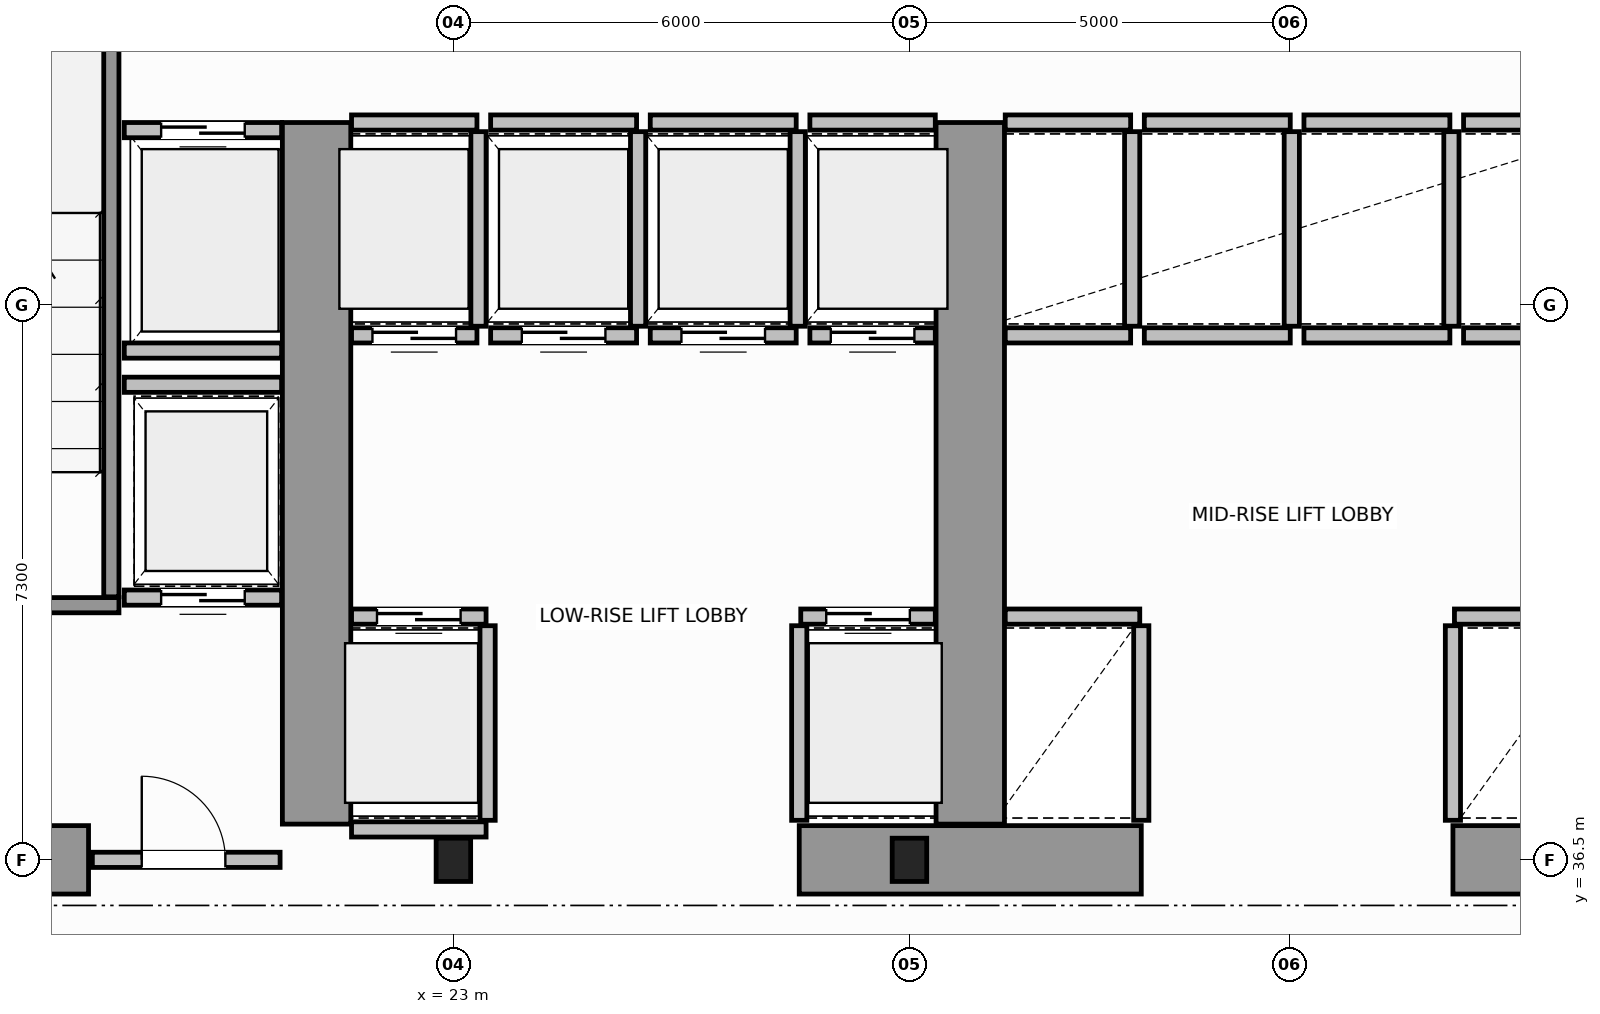
"""IFC4 building model, lengths in metres.
Left out: names, types, materials, properties, quantities, classifications, styles, units other than length and angle.
Written with IfcOpenShell. Run it as: python <this file> out.ifc"""

import sys

from ifc_helpers import new_model, si_unit, direction, frame, frame_2d, origin, origin_2d, place, context, subcontext, project, spatial, rectangle, i_section, extrude, source, transform, mapped, element, fill, save


model = new_model("IFC4")
c1 = context("Model", 3, precision=1e-05, world=origin(), true_north=direction((0.0, 1.0)))
c2 = subcontext(c1, "Body", "Model", "MODEL_VIEW")
j1 = project(units=[si_unit("LENGTHUNIT", "METRE"), si_unit("PLANEANGLEUNIT", "RADIAN")], contexts=[c1])
p1 = place(None, origin())
s1 = spatial("IfcSite", under=j1, at=p1, CompositionType="ELEMENT")
p2 = place(p1, origin())
s2 = spatial("IfcBuilding", under=s1, at=p2, CompositionType="ELEMENT")
p3 = place(p2, frame((0.0, 0.0, 41.6)))
s3 = spatial("IfcBuildingStorey", under=s2, at=p3, CompositionType="ELEMENT", Elevation=41.6)
m1 = source(origin(), c2, "Body", "SweptSolid", [
    extrude(i_section(OverallWidth=0.454, OverallDepth=0.569, WebThickness=0.078, FlangeThickness=0.08, FilletRadius=0.015, at=origin_2d()), origin(), (0.0, 0.0, 1.0), 3.8),
])
for number, where, z_axis, x_axis in (
    (1, (23.0, 36.5, 0.0), (0.0, 0.0, 1.0), (1.0, 0.0, 0.0)),
    (2, (29.0, 36.5, 0.0), (0.0, 0.0, 1.0), (1.0, 0.0, 0.0)),
):
    element("IfcColumn", number, at=place(p3, frame(where, z_axis=z_axis, x_axis=x_axis)), inside=s3, PredefinedType="COLUMN", context=c2, shape_type="MappedRepresentation", body=[
        mapped(m1, transform((0.0, 0.0, 0.0), scale=1.0)),
    ])
p4 = place(p3, frame((14.47, 36.5, 0.0), z_axis=(0.0, 0.0, 1.0), x_axis=(1.0, 0.0, 0.0)))
e3 = element("IfcWall", 3, at=p4, inside=s3, PredefinedType="SHEAR", context=c2, shape_type="SweptSolid", body=[
    extrude(rectangle(XDim=3.73, YDim=0.9, at=frame_2d((1.865, 0.0))), origin(), (0.0, 0.0, 1.0), 2.38),
])
for number, where, z_axis, x_axis in (
    (4, (27.55, 36.5, 0.0), (0.0, 0.0, 1.0), (1.0, 0.0, 0.0)),
    (5, (36.15, 36.5, 0.0), (0.0, 0.0, 1.0), (1.0, 0.0, 0.0)),
):
    element("IfcWall", number, at=place(p3, frame(where, z_axis=z_axis, x_axis=x_axis)), inside=s3, PredefinedType="SHEAR", context=c2, shape_type="SweptSolid", body=[
        extrude(rectangle(XDim=4.5, YDim=0.9, at=frame_2d((2.25, 0.0))), origin(), (0.0, 0.0, 1.0), 3.8),
    ])
for number, where, z_axis, x_axis in (
    (6, (21.2, 36.97, 0.0), (0.0, 0.0, 1.0), (0.0, 1.0, 0.0)),
    (7, (29.8, 36.97, 0.0), (0.0, 0.0, 1.0), (0.0, 1.0, 0.0)),
):
    element("IfcWall", number, at=place(p3, frame(where, z_axis=z_axis, x_axis=x_axis)), inside=s3, PredefinedType="SHEAR", context=c2, shape_type="SweptSolid", body=[
        extrude(rectangle(XDim=9.23, YDim=0.9, at=frame_2d((4.615, 0.0))), origin(), (0.0, 0.0, 1.0), 3.8),
    ])
p5 = place(p3, frame((14.45, 39.85, 0.0), z_axis=(0.0, 0.0, 1.0), x_axis=(1.0, 0.0, 0.0)))
e8 = element("IfcWall", 8, at=p5, inside=s3, PredefinedType="SOLIDWALL", context=c2, shape_type="SweptSolid", body=[
    extrude(rectangle(XDim=4.15, YDim=0.2, at=frame_2d((2.075, 0.0))), origin(), (0.0, 0.0, 1.0), 3.8),
])
p6 = place(p5, frame((1.725, 0.0, 0.0)))
e9 = element("IfcOpeningElement", 9, at=p6, cuts=e8, PredefinedType="OPENING", context=c2, shape_type="SweptSolid", body=[
    extrude(rectangle(XDim=1.1, YDim=2.15, at=frame_2d((0.55, 1.075))), frame((0.0, 0.11, 0.0), z_axis=(0.0, -1.0, 0.0), x_axis=(1.0, 0.0, 0.0)), (0.0, 0.0, 1.0), 0.22),
])
p7 = place(p3, frame((18.5, 39.96, 0.0), z_axis=(0.0, 0.0, 1.0), x_axis=(0.0, 1.0, 0.0)))
e10 = element("IfcWall", 10, at=p7, inside=s3, PredefinedType="SOLIDWALL", context=c2, shape_type="SweptSolid", body=[
    extrude(rectangle(XDim=9.93, YDim=0.2, at=frame_2d((4.965, 0.0))), origin(), (0.0, 0.0, 1.0), 3.8),
])
p8 = place(p3, frame((18.25, 36.5, 0.0), z_axis=(0.0, 0.0, 1.0), x_axis=(1.0, 0.0, 0.0)))
e11 = element("IfcWall", 11, at=p8, inside=s3, PredefinedType="SOLIDWALL", context=c2, shape_type="SweptSolid", body=[
    extrude(rectangle(XDim=2.47, YDim=0.2, at=frame_2d((1.235, 0.0))), origin(), (0.0, 0.0, 1.0), 2.37),
])
p9 = place(p8, frame((0.65, 0.0, 0.0)))
e12 = element("IfcOpeningElement", 12, at=p9, cuts=e11, PredefinedType="OPENING", context=c2, shape_type="SweptSolid", body=[
    extrude(rectangle(XDim=1.1, YDim=2.15, at=frame_2d((0.55, 1.075))), frame((0.0, 0.11, 0.0), z_axis=(0.0, -1.0, 0.0), x_axis=(1.0, 0.0, 0.0)), (0.0, 0.0, 1.0), 0.22),
])
p10 = place(p3, frame((21.66, 39.7, 0.0), z_axis=(0.0, 0.0, 1.0), x_axis=(1.0, 0.0, 0.0)))
e13 = element("IfcWall", 13, at=p10, inside=s3, PredefinedType="SOLIDWALL", context=c2, shape_type="SweptSolid", body=[
    extrude(rectangle(XDim=1.77, YDim=0.2, at=frame_2d((0.885, 0.0))), origin(), (0.0, 0.0, 1.0), 3.58),
])
p11 = place(p10, frame((0.335, 0.0, 0.0)))
e14 = element("IfcOpeningElement", 14, at=p11, cuts=e13, PredefinedType="OPENING", context=c2, shape_type="SweptSolid", body=[
    extrude(rectangle(XDim=1.1, YDim=2.15, at=frame_2d((0.55, 1.075))), frame((0.0, 0.11, 0.0), z_axis=(0.0, -1.0, 0.0), x_axis=(1.0, 0.0, 0.0)), (0.0, 0.0, 1.0), 0.22),
])
p12 = place(p3, frame((21.66, 36.9, 0.0), z_axis=(0.0, 0.0, 1.0), x_axis=(1.0, 0.0, 0.0)))
e15 = element("IfcWall", 15, at=p12, inside=s3, PredefinedType="SOLIDWALL", context=c2, shape_type="SweptSolid", body=[
    extrude(rectangle(XDim=1.77, YDim=0.2, at=frame_2d((0.885, 0.0))), origin(), (0.0, 0.0, 1.0), 2.37),
])
p13 = place(p3, frame((23.45, 37.02, 0.0), z_axis=(0.0, 0.0, 1.0), x_axis=(0.0, 1.0, 0.0)))
e16 = element("IfcWall", 16, at=p13, inside=s3, PredefinedType="SOLIDWALL", context=c2, shape_type="SweptSolid", body=[
    extrude(rectangle(XDim=2.56, YDim=0.2, at=frame_2d((1.28, 0.0))), origin(), (0.0, 0.0, 1.0), 3.58),
])
p14 = place(p3, frame((27.57, 39.7, 0.0), z_axis=(0.0, 0.0, 1.0), x_axis=(1.0, 0.0, 0.0)))
e17 = element("IfcWall", 17, at=p14, inside=s3, PredefinedType="SOLIDWALL", context=c2, shape_type="SweptSolid", body=[
    extrude(rectangle(XDim=1.77, YDim=0.2, at=frame_2d((0.885, 0.0))), origin(), (0.0, 0.0, 1.0), 3.58),
])
p15 = place(p14, frame((0.335, 0.0, 0.0)))
e18 = element("IfcOpeningElement", 18, at=p15, cuts=e17, PredefinedType="OPENING", context=c2, shape_type="SweptSolid", body=[
    extrude(rectangle(XDim=1.1, YDim=2.15, at=frame_2d((0.55, 1.075))), frame((0.0, 0.11, 0.0), z_axis=(0.0, -1.0, 0.0), x_axis=(1.0, 0.0, 0.0)), (0.0, 0.0, 1.0), 0.22),
])
p16 = place(p3, frame((27.55, 37.02, 0.0), z_axis=(0.0, 0.0, 1.0), x_axis=(0.0, 1.0, 0.0)))
e19 = element("IfcWall", 19, at=p16, inside=s3, PredefinedType="SOLIDWALL", context=c2, shape_type="SweptSolid", body=[
    extrude(rectangle(XDim=2.56, YDim=0.2, at=frame_2d((1.28, 0.0))), origin(), (0.0, 0.0, 1.0), 3.58),
])
p17 = place(p3, frame((21.66, 43.4, 0.0), z_axis=(0.0, 0.0, 1.0), x_axis=(1.0, 0.0, 0.0)))
e20 = element("IfcWall", 20, at=p17, inside=s3, PredefinedType="SOLIDWALL", context=c2, shape_type="SweptSolid", body=[
    extrude(rectangle(XDim=1.65, YDim=0.2, at=frame_2d((0.825, 0.0))), origin(), (0.0, 0.0, 1.0), 3.58),
])
p18 = place(p17, frame((0.275, 0.0, 0.0)))
e21 = element("IfcOpeningElement", 21, at=p18, cuts=e20, PredefinedType="OPENING", context=c2, shape_type="SweptSolid", body=[
    extrude(rectangle(XDim=1.1, YDim=2.15, at=frame_2d((0.55, 1.075))), frame((0.0, 0.11, 0.0), z_axis=(0.0, -1.0, 0.0), x_axis=(1.0, 0.0, 0.0)), (0.0, 0.0, 1.0), 0.22),
])
p19 = place(p3, frame((21.66, 46.2, 0.0), z_axis=(0.0, 0.0, 1.0), x_axis=(1.0, 0.0, 0.0)))
e22 = element("IfcWall", 22, at=p19, inside=s3, PredefinedType="SOLIDWALL", context=c2, shape_type="SweptSolid", body=[
    extrude(rectangle(XDim=1.65, YDim=0.2, at=frame_2d((0.825, 0.0))), origin(), (0.0, 0.0, 1.0), 3.58),
])
p20 = place(p3, frame((23.33, 43.52, 0.0), z_axis=(0.0, 0.0, 1.0), x_axis=(0.0, 1.0, 0.0)))
e23 = element("IfcWall", 23, at=p20, inside=s3, PredefinedType="SOLIDWALL", context=c2, shape_type="SweptSolid", body=[
    extrude(rectangle(XDim=2.56, YDim=0.2, at=frame_2d((1.28, 0.0))), origin(), (0.0, 0.0, 1.0), 3.58),
])
p21 = place(p3, frame((23.49, 43.4, 0.0), z_axis=(0.0, 0.0, 1.0), x_axis=(1.0, 0.0, 0.0)))
e24 = element("IfcWall", 24, at=p21, inside=s3, PredefinedType="SOLIDWALL", context=c2, shape_type="SweptSolid", body=[
    extrude(rectangle(XDim=1.92, YDim=0.2, at=frame_2d((0.96, 0.0))), origin(), (0.0, 0.0, 1.0), 3.58),
])
p22 = place(p21, frame((0.41, 0.0, 0.0)))
e25 = element("IfcOpeningElement", 25, at=p22, cuts=e24, PredefinedType="OPENING", context=c2, shape_type="SweptSolid", body=[
    extrude(rectangle(XDim=1.1, YDim=2.15, at=frame_2d((0.55, 1.075))), frame((0.0, 0.11, 0.0), z_axis=(0.0, -1.0, 0.0), x_axis=(1.0, 0.0, 0.0)), (0.0, 0.0, 1.0), 0.22),
])
p23 = place(p3, frame((23.49, 46.2, 0.0), z_axis=(0.0, 0.0, 1.0), x_axis=(1.0, 0.0, 0.0)))
e26 = element("IfcWall", 26, at=p23, inside=s3, PredefinedType="SOLIDWALL", context=c2, shape_type="SweptSolid", body=[
    extrude(rectangle(XDim=1.92, YDim=0.2, at=frame_2d((0.96, 0.0))), origin(), (0.0, 0.0, 1.0), 3.58),
])
p24 = place(p3, frame((25.43, 43.52, 0.0), z_axis=(0.0, 0.0, 1.0), x_axis=(0.0, 1.0, 0.0)))
e27 = element("IfcWall", 27, at=p24, inside=s3, PredefinedType="SOLIDWALL", context=c2, shape_type="SweptSolid", body=[
    extrude(rectangle(XDim=2.56, YDim=0.2, at=frame_2d((1.28, 0.0))), origin(), (0.0, 0.0, 1.0), 3.58),
])
p25 = place(p3, frame((25.59, 43.4, 0.0), z_axis=(0.0, 0.0, 1.0), x_axis=(1.0, 0.0, 0.0)))
e28 = element("IfcWall", 28, at=p25, inside=s3, PredefinedType="SOLIDWALL", context=c2, shape_type="SweptSolid", body=[
    extrude(rectangle(XDim=1.92, YDim=0.2, at=frame_2d((0.96, 0.0))), origin(), (0.0, 0.0, 1.0), 3.58),
])
p26 = place(p25, frame((0.41, 0.0, 0.0)))
e29 = element("IfcOpeningElement", 29, at=p26, cuts=e28, PredefinedType="OPENING", context=c2, shape_type="SweptSolid", body=[
    extrude(rectangle(XDim=1.1, YDim=2.15, at=frame_2d((0.55, 1.075))), frame((0.0, 0.11, 0.0), z_axis=(0.0, -1.0, 0.0), x_axis=(1.0, 0.0, 0.0)), (0.0, 0.0, 1.0), 0.22),
])
p27 = place(p3, frame((25.59, 46.2, 0.0), z_axis=(0.0, 0.0, 1.0), x_axis=(1.0, 0.0, 0.0)))
e30 = element("IfcWall", 30, at=p27, inside=s3, PredefinedType="SOLIDWALL", context=c2, shape_type="SweptSolid", body=[
    extrude(rectangle(XDim=1.92, YDim=0.2, at=frame_2d((0.96, 0.0))), origin(), (0.0, 0.0, 1.0), 3.58),
])
p28 = place(p3, frame((27.53, 43.52, 0.0), z_axis=(0.0, 0.0, 1.0), x_axis=(0.0, 1.0, 0.0)))
e31 = element("IfcWall", 31, at=p28, inside=s3, PredefinedType="SOLIDWALL", context=c2, shape_type="SweptSolid", body=[
    extrude(rectangle(XDim=2.56, YDim=0.2, at=frame_2d((1.28, 0.0))), origin(), (0.0, 0.0, 1.0), 3.58),
])
p29 = place(p3, frame((27.69, 43.4, 0.0), z_axis=(0.0, 0.0, 1.0), x_axis=(1.0, 0.0, 0.0)))
e32 = element("IfcWall", 32, at=p29, inside=s3, PredefinedType="SOLIDWALL", context=c2, shape_type="SweptSolid", body=[
    extrude(rectangle(XDim=1.65, YDim=0.2, at=frame_2d((0.825, 0.0))), origin(), (0.0, 0.0, 1.0), 3.58),
])
p30 = place(p29, frame((0.275, 0.0, 0.0)))
e33 = element("IfcOpeningElement", 33, at=p30, cuts=e32, PredefinedType="OPENING", context=c2, shape_type="SweptSolid", body=[
    extrude(rectangle(XDim=1.1, YDim=2.15, at=frame_2d((0.55, 1.075))), frame((0.0, 0.11, 0.0), z_axis=(0.0, -1.0, 0.0), x_axis=(1.0, 0.0, 0.0)), (0.0, 0.0, 1.0), 0.22),
])
p31 = place(p3, frame((27.69, 46.2, 0.0), z_axis=(0.0, 0.0, 1.0), x_axis=(1.0, 0.0, 0.0)))
e34 = element("IfcWall", 34, at=p31, inside=s3, PredefinedType="SOLIDWALL", context=c2, shape_type="SweptSolid", body=[
    extrude(rectangle(XDim=1.65, YDim=0.2, at=frame_2d((0.825, 0.0))), origin(), (0.0, 0.0, 1.0), 3.58),
])
p32 = place(p3, frame((30.26, 39.7, 0.0), z_axis=(0.0, 0.0, 1.0), x_axis=(1.0, 0.0, 0.0)))
e35 = element("IfcWall", 35, at=p32, inside=s3, PredefinedType="SOLIDWALL", context=c2, shape_type="SweptSolid", body=[
    extrude(rectangle(XDim=1.77, YDim=0.2, at=frame_2d((0.885, 0.0))), origin(), (0.0, 0.0, 1.0), 3.58),
])
p33 = place(p3, frame((32.05, 37.02, 0.0), z_axis=(0.0, 0.0, 1.0), x_axis=(0.0, 1.0, 0.0)))
e36 = element("IfcWall", 36, at=p33, inside=s3, PredefinedType="SOLIDWALL", context=c2, shape_type="SweptSolid", body=[
    extrude(rectangle(XDim=2.56, YDim=0.2, at=frame_2d((1.28, 0.0))), origin(), (0.0, 0.0, 1.0), 3.58),
])
p34 = place(p3, frame((36.17, 39.7, 0.0), z_axis=(0.0, 0.0, 1.0), x_axis=(1.0, 0.0, 0.0)))
e37 = element("IfcWall", 37, at=p34, inside=s3, PredefinedType="SOLIDWALL", context=c2, shape_type="SweptSolid", body=[
    extrude(rectangle(XDim=1.77, YDim=0.2, at=frame_2d((0.885, 0.0))), origin(), (0.0, 0.0, 1.0), 3.58),
])
p35 = place(p3, frame((36.15, 37.02, 0.0), z_axis=(0.0, 0.0, 1.0), x_axis=(0.0, 1.0, 0.0)))
e38 = element("IfcWall", 38, at=p35, inside=s3, PredefinedType="SOLIDWALL", context=c2, shape_type="SweptSolid", body=[
    extrude(rectangle(XDim=2.56, YDim=0.2, at=frame_2d((1.28, 0.0))), origin(), (0.0, 0.0, 1.0), 3.58),
])
for number, where, z_axis, x_axis in (
    (39, (30.26, 43.4, 0.0), (0.0, 0.0, 1.0), (1.0, 0.0, 0.0)),
    (40, (30.26, 46.2, 0.0), (0.0, 0.0, 1.0), (1.0, 0.0, 0.0)),
):
    element("IfcWall", number, at=place(p3, frame(where, z_axis=z_axis, x_axis=x_axis)), inside=s3, PredefinedType="SOLIDWALL", context=c2, shape_type="SweptSolid", body=[
        extrude(rectangle(XDim=1.65, YDim=0.2, at=frame_2d((0.825, 0.0))), origin(), (0.0, 0.0, 1.0), 3.58),
    ])
p36 = place(p3, frame((31.93, 43.52, 0.0), z_axis=(0.0, 0.0, 1.0), x_axis=(0.0, 1.0, 0.0)))
e41 = element("IfcWall", 41, at=p36, inside=s3, PredefinedType="SOLIDWALL", context=c2, shape_type="SweptSolid", body=[
    extrude(rectangle(XDim=2.56, YDim=0.2, at=frame_2d((1.28, 0.0))), origin(), (0.0, 0.0, 1.0), 3.58),
])
for number, where, z_axis, x_axis in (
    (42, (32.09, 43.4, 0.0), (0.0, 0.0, 1.0), (1.0, 0.0, 0.0)),
    (43, (32.09, 46.2, 0.0), (0.0, 0.0, 1.0), (1.0, 0.0, 0.0)),
):
    element("IfcWall", number, at=place(p3, frame(where, z_axis=z_axis, x_axis=x_axis)), inside=s3, PredefinedType="SOLIDWALL", context=c2, shape_type="SweptSolid", body=[
        extrude(rectangle(XDim=1.92, YDim=0.2, at=frame_2d((0.96, 0.0))), origin(), (0.0, 0.0, 1.0), 3.58),
    ])
p37 = place(p3, frame((34.03, 43.52, 0.0), z_axis=(0.0, 0.0, 1.0), x_axis=(0.0, 1.0, 0.0)))
e44 = element("IfcWall", 44, at=p37, inside=s3, PredefinedType="SOLIDWALL", context=c2, shape_type="SweptSolid", body=[
    extrude(rectangle(XDim=2.56, YDim=0.2, at=frame_2d((1.28, 0.0))), origin(), (0.0, 0.0, 1.0), 3.58),
])
for number, where, z_axis, x_axis in (
    (45, (34.19, 43.4, 0.0), (0.0, 0.0, 1.0), (1.0, 0.0, 0.0)),
    (46, (34.19, 46.2, 0.0), (0.0, 0.0, 1.0), (1.0, 0.0, 0.0)),
):
    element("IfcWall", number, at=place(p3, frame(where, z_axis=z_axis, x_axis=x_axis)), inside=s3, PredefinedType="SOLIDWALL", context=c2, shape_type="SweptSolid", body=[
        extrude(rectangle(XDim=1.92, YDim=0.2, at=frame_2d((0.96, 0.0))), origin(), (0.0, 0.0, 1.0), 3.58),
    ])
p38 = place(p3, frame((36.13, 43.52, 0.0), z_axis=(0.0, 0.0, 1.0), x_axis=(0.0, 1.0, 0.0)))
e47 = element("IfcWall", 47, at=p38, inside=s3, PredefinedType="SOLIDWALL", context=c2, shape_type="SweptSolid", body=[
    extrude(rectangle(XDim=2.56, YDim=0.2, at=frame_2d((1.28, 0.0))), origin(), (0.0, 0.0, 1.0), 3.58),
])
for number, where, z_axis, x_axis in (
    (48, (36.29, 43.4, 0.0), (0.0, 0.0, 1.0), (1.0, 0.0, 0.0)),
    (49, (36.29, 46.2, 0.0), (0.0, 0.0, 1.0), (1.0, 0.0, 0.0)),
):
    element("IfcWall", number, at=place(p3, frame(where, z_axis=z_axis, x_axis=x_axis)), inside=s3, PredefinedType="SOLIDWALL", context=c2, shape_type="SweptSolid", body=[
        extrude(rectangle(XDim=1.65, YDim=0.2, at=frame_2d((0.825, 0.0))), origin(), (0.0, 0.0, 1.0), 3.58),
    ])
p39 = place(p3, frame((18.67, 46.1, 0.0), z_axis=(0.0, 0.0, 1.0), x_axis=(1.0, 0.0, 0.0)))
e50 = element("IfcWall", 50, at=p39, inside=s3, PredefinedType="SOLIDWALL", context=c2, shape_type="SweptSolid", body=[
    extrude(rectangle(XDim=2.07, YDim=0.2, at=frame_2d((1.035, 0.0))), origin(), (0.0, 0.0, 1.0), 3.58),
])
p40 = place(p39, frame((0.485, 0.0, 0.0)))
e51 = element("IfcOpeningElement", 51, at=p40, cuts=e50, PredefinedType="OPENING", context=c2, shape_type="SweptSolid", body=[
    extrude(rectangle(XDim=1.1, YDim=2.15, at=frame_2d((0.55, 1.075))), frame((0.0, 0.11, 0.0), z_axis=(0.0, -1.0, 0.0), x_axis=(1.0, 0.0, 0.0)), (0.0, 0.0, 1.0), 0.22),
])
p41 = place(p3, frame((18.67, 43.2, 0.0), z_axis=(0.0, 0.0, 1.0), x_axis=(1.0, 0.0, 0.0)))
e52 = element("IfcWall", 52, at=p41, inside=s3, PredefinedType="SOLIDWALL", context=c2, shape_type="SweptSolid", body=[
    extrude(rectangle(XDim=2.07, YDim=0.2, at=frame_2d((1.035, 0.0))), origin(), (0.0, 0.0, 1.0), 3.58),
])
p42 = place(p3, frame((18.67, 39.95, 0.0), z_axis=(0.0, 0.0, 1.0), x_axis=(1.0, 0.0, 0.0)))
e53 = element("IfcWall", 53, at=p42, inside=s3, PredefinedType="SOLIDWALL", context=c2, shape_type="SweptSolid", body=[
    extrude(rectangle(XDim=2.07, YDim=0.2, at=frame_2d((1.035, 0.0))), origin(), (0.0, 0.0, 1.0), 3.58),
])
p43 = place(p42, frame((0.485, 0.0, 0.0)))
e54 = element("IfcOpeningElement", 54, at=p43, cuts=e53, PredefinedType="OPENING", context=c2, shape_type="SweptSolid", body=[
    extrude(rectangle(XDim=1.1, YDim=2.15, at=frame_2d((0.55, 1.075))), frame((0.0, 0.11, 0.0), z_axis=(0.0, -1.0, 0.0), x_axis=(1.0, 0.0, 0.0)), (0.0, 0.0, 1.0), 0.22),
])
p44 = place(p3, frame((18.67, 42.75, 0.0), z_axis=(0.0, 0.0, 1.0), x_axis=(1.0, 0.0, 0.0)))
e55 = element("IfcWall", 55, at=p44, inside=s3, PredefinedType="SOLIDWALL", context=c2, shape_type="SweptSolid", body=[
    extrude(rectangle(XDim=2.07, YDim=0.2, at=frame_2d((1.035, 0.0))), origin(), (0.0, 0.0, 1.0), 3.58),
])
m2 = source(origin(), c2, "Body", "SweptSolid", [
    extrude(rectangle(XDim=1.1, YDim=2.15, at=frame_2d((0.55, 1.075))), frame((0.0, 0.025, 0.0), z_axis=(0.0, -1.0, 0.0), x_axis=(1.0, 0.0, 0.0)), (0.0, 0.0, 1.0), 0.05),
])
p45 = place(p9, origin())
e56 = element("IfcDoor", 56, at=p45, inside=s3, OperationType="SINGLE_SWING_RIGHT", PredefinedType="DOOR", context=c2, shape_type="MappedRepresentation", body=[
    mapped(m2, transform((0.0, 0.0, 0.0), scale=1.0)),
])
fill(e12, e56)
p46 = place(p11, origin())
e57 = element("IfcDoor", 57, at=p46, inside=s3, OperationType="DOUBLE_DOOR_SLIDING", PredefinedType="DOOR", context=c2, shape_type="MappedRepresentation", body=[
    mapped(m2, transform((0.0, 0.0, 0.0), scale=1.0)),
])
fill(e14, e57)
p47 = place(p15, origin())
e58 = element("IfcDoor", 58, at=p47, inside=s3, OperationType="DOUBLE_DOOR_SLIDING", PredefinedType="DOOR", context=c2, shape_type="MappedRepresentation", body=[
    mapped(m2, transform((0.0, 0.0, 0.0), scale=1.0)),
])
fill(e18, e58)
p48 = place(p18, origin())
e59 = element("IfcDoor", 59, at=p48, inside=s3, OperationType="DOUBLE_DOOR_SLIDING", PredefinedType="DOOR", context=c2, shape_type="MappedRepresentation", body=[
    mapped(m2, transform((0.0, 0.0, 0.0), scale=1.0)),
])
fill(e21, e59)
p49 = place(p22, origin())
e60 = element("IfcDoor", 60, at=p49, inside=s3, OperationType="DOUBLE_DOOR_SLIDING", PredefinedType="DOOR", context=c2, shape_type="MappedRepresentation", body=[
    mapped(m2, transform((0.0, 0.0, 0.0), scale=1.0)),
])
fill(e25, e60)
p50 = place(p26, origin())
e61 = element("IfcDoor", 61, at=p50, inside=s3, OperationType="DOUBLE_DOOR_SLIDING", PredefinedType="DOOR", context=c2, shape_type="MappedRepresentation", body=[
    mapped(m2, transform((0.0, 0.0, 0.0), scale=1.0)),
])
fill(e29, e61)
p51 = place(p30, origin())
e62 = element("IfcDoor", 62, at=p51, inside=s3, OperationType="DOUBLE_DOOR_SLIDING", PredefinedType="DOOR", context=c2, shape_type="MappedRepresentation", body=[
    mapped(m2, transform((0.0, 0.0, 0.0), scale=1.0)),
])
fill(e33, e62)
p52 = place(p40, origin())
e63 = element("IfcDoor", 63, at=p52, inside=s3, OperationType="DOUBLE_DOOR_SLIDING", PredefinedType="DOOR", context=c2, shape_type="MappedRepresentation", body=[
    mapped(m2, transform((0.0, 0.0, 0.0), scale=1.0)),
])
fill(e51, e63)
p53 = place(p43, origin())
e64 = element("IfcDoor", 64, at=p53, inside=s3, OperationType="DOUBLE_DOOR_SLIDING", PredefinedType="DOOR", context=c2, shape_type="MappedRepresentation", body=[
    mapped(m2, transform((0.0, 0.0, 0.0), scale=1.0)),
])
fill(e54, e64)
save(model, sys.argv[1])
